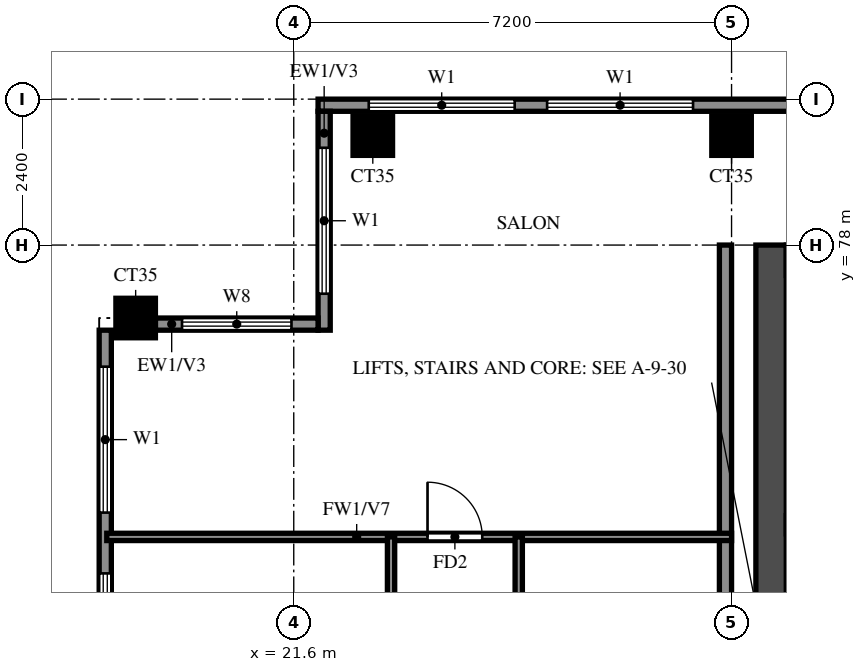
"""IFC4 building model, lengths in metres.
Left out: names, types, materials, properties, quantities, classifications, styles, units other than length and angle.
Written with IfcOpenShell. Run it as: python <this file> out.ifc"""

import sys

from ifc_helpers import new_model, si_unit, direction, frame, frame_2d, origin, origin_2d, place, context, subcontext, project, spatial, rectangle, extrude, source, transform, mapped, element, fill, save


model = new_model("IFC4")
c1 = context("Model", 3, precision=1e-05, world=origin(), true_north=direction((0.0, 1.0)))
c2 = subcontext(c1, "Body", "Model", "MODEL_VIEW")
j1 = project(units=[si_unit("LENGTHUNIT", "METRE"), si_unit("PLANEANGLEUNIT", "RADIAN")], contexts=[c1])
p1 = place(None, origin())
s1 = spatial("IfcSite", under=j1, at=p1, CompositionType="ELEMENT")
p2 = place(p1, origin())
s2 = spatial("IfcBuilding", under=s1, at=p2, CompositionType="ELEMENT")
p3 = place(p2, frame((0.0, 0.0, 236.0)))
s3 = spatial("IfcBuildingStorey", under=s2, at=p3, CompositionType="ELEMENT", Elevation=236.0)
m1 = source(origin(), c2, "Body", "SweptSolid", [
    extrude(rectangle(XDim=0.65, YDim=0.65, at=origin_2d()), origin(), (0.0, 0.0, 1.0), 3.22),
])
for number, where, z_axis, x_axis in (
    (1, (19.0, 76.8, 0.0), (0.0, 0.0, 1.0), (1.0, 0.0, 0.0)),
    (2, (22.9, 79.8, 0.0), (0.0, 0.0, 1.0), (1.0, 0.0, 0.0)),
    (3, (28.8, 79.8, 0.0), (0.0, 0.0, 1.0), (1.0, 0.0, 0.0)),
):
    element("IfcColumn", number, at=place(p3, frame(where, z_axis=z_axis, x_axis=x_axis)), inside=s3, PredefinedType="COLUMN", context=c2, shape_type="MappedRepresentation", body=[
        mapped(m1, transform((0.0, 0.0, 0.0))),
    ])
p4 = place(p3, frame((29.45, 66.15, 0.0), z_axis=(0.0, 0.0, 1.0), x_axis=(0.0, 1.0, 0.0)))
e4 = element("IfcWall", 4, at=p4, inside=s3, PredefinedType="SHEAR", context=c2, shape_type="SweptSolid", body=[
    extrude(rectangle(XDim=11.85, YDim=0.5, at=frame_2d((5.925, 0.0))), origin(), (0.0, 0.0, 1.0), 3.22),
])
p5 = place(p3, frame((78.6, 80.3, 0.0), z_axis=(0.0, 0.0, 1.0), x_axis=(-1.0, 0.0, 0.0)))
e5 = element("IfcWall", 5, at=p5, inside=s3, PredefinedType="SOLIDWALL", context=c2, shape_type="SweptSolid", body=[
    extrude(rectangle(XDim=56.6, YDim=0.2, at=frame_2d((28.3, 0.0))), origin(), (0.0, 0.0, 1.0), 3.22),
])
p6 = place(p5, frame((3.9, 0.0, 0.0)))
e6 = element("IfcOpeningElement", 6, at=p6, cuts=e5, PredefinedType="OPENING", context=c2, shape_type="SweptSolid", body=[
    extrude(rectangle(XDim=1.8, YDim=2.4, at=frame_2d((0.9, 1.2))), frame((0.0, 0.11, 0.0), z_axis=(0.0, -1.0, 0.0), x_axis=(1.0, 0.0, 0.0)), (0.0, 0.0, 1.0), 0.22),
])
p7 = place(p5, frame((50.433, 0.0, 0.6)))
e7 = element("IfcOpeningElement", 7, at=p7, cuts=e5, PredefinedType="OPENING", context=c2, shape_type="SweptSolid", body=[
    extrude(rectangle(XDim=2.4, YDim=2.4, at=frame_2d((1.2, 1.2))), frame((0.0, 0.11, 0.0), z_axis=(0.0, -1.0, 0.0), x_axis=(1.0, 0.0, 0.0)), (0.0, 0.0, 1.0), 0.22),
])
p8 = place(p5, frame((53.367, 0.0, 0.6)))
e8 = element("IfcOpeningElement", 8, at=p8, cuts=e5, PredefinedType="OPENING", context=c2, shape_type="SweptSolid", body=[
    extrude(rectangle(XDim=2.4, YDim=2.4, at=frame_2d((1.2, 1.2))), frame((0.0, 0.11, 0.0), z_axis=(0.0, -1.0, 0.0), x_axis=(1.0, 0.0, 0.0)), (0.0, 0.0, 1.0), 0.22),
])
p9 = place(p5, frame((0.4, 0.0, 0.6)))
e9 = element("IfcOpeningElement", 9, at=p9, cuts=e5, PredefinedType="OPENING", context=c2, shape_type="SweptSolid", body=[
    extrude(rectangle(XDim=1.2, YDim=2.4, at=frame_2d((0.6, 1.2))), frame((0.0, 0.11, 0.0), z_axis=(0.0, -1.0, 0.0), x_axis=(1.0, 0.0, 0.0)), (0.0, 0.0, 1.0), 0.22),
])
p10 = place(p5, frame((2.55, 0.0, 0.6)))
e10 = element("IfcOpeningElement", 10, at=p10, cuts=e5, PredefinedType="OPENING", context=c2, shape_type="SweptSolid", body=[
    extrude(rectangle(XDim=0.9, YDim=2.4, at=frame_2d((0.45, 1.2))), frame((0.0, 0.11, 0.0), z_axis=(0.0, -1.0, 0.0), x_axis=(1.0, 0.0, 0.0)), (0.0, 0.0, 1.0), 0.22),
])
p11 = place(p3, frame((22.1, 80.2, 0.0), z_axis=(0.0, 0.0, 1.0), x_axis=(0.0, -1.0, 0.0)))
e11 = element("IfcWall", 11, at=p11, inside=s3, PredefinedType="SOLIDWALL", context=c2, shape_type="SweptSolid", body=[
    extrude(rectangle(XDim=3.6, YDim=0.2, at=frame_2d((1.8, 0.0))), origin(), (0.0, 0.0, 1.0), 3.22),
])
p12 = place(p11, frame((0.6, 0.0, 0.6)))
e12 = element("IfcOpeningElement", 12, at=p12, cuts=e11, PredefinedType="OPENING", context=c2, shape_type="SweptSolid", body=[
    extrude(rectangle(XDim=2.4, YDim=2.4, at=frame_2d((1.2, 1.2))), frame((0.0, 0.11, 0.0), z_axis=(0.0, -1.0, 0.0), x_axis=(1.0, 0.0, 0.0)), (0.0, 0.0, 1.0), 0.22),
])
p13 = place(p3, frame((22.0, 76.7, 0.0), z_axis=(0.0, 0.0, 1.0), x_axis=(-1.0, 0.0, 0.0)))
e13 = element("IfcWall", 13, at=p13, inside=s3, PredefinedType="SOLIDWALL", context=c2, shape_type="SweptSolid", body=[
    extrude(rectangle(XDim=2.675, YDim=0.2, at=frame_2d((1.337, 0.0))), origin(), (0.0, 0.0, 1.0), 3.22),
])
p14 = place(p13, frame((0.438, 0.0, 0.6)))
e14 = element("IfcOpeningElement", 14, at=p14, cuts=e13, PredefinedType="OPENING", context=c2, shape_type="SweptSolid", body=[
    extrude(rectangle(XDim=1.8, YDim=2.4, at=frame_2d((0.9, 1.2))), frame((0.0, 0.11, 0.0), z_axis=(0.0, -1.0, 0.0), x_axis=(1.0, 0.0, 0.0)), (0.0, 0.0, 1.0), 0.22),
])
p15 = place(p3, frame((18.5, 76.6, 0.0), z_axis=(0.0, 0.0, 1.0), x_axis=(0.0, -1.0, 0.0)))
e15 = element("IfcWall", 15, at=p15, inside=s3, PredefinedType="SOLIDWALL", context=c2, shape_type="SweptSolid", body=[
    extrude(rectangle(XDim=14.2, YDim=0.2, at=frame_2d((7.1, 0.0))), origin(), (0.0, 0.0, 1.0), 3.22),
])
p16 = place(p15, frame((11.1, 0.0, 0.6)))
e16 = element("IfcOpeningElement", 16, at=p16, cuts=e15, PredefinedType="OPENING", context=c2, shape_type="SweptSolid", body=[
    extrude(rectangle(XDim=2.4, YDim=2.4, at=frame_2d((1.2, 1.2))), frame((0.0, 0.11, 0.0), z_axis=(0.0, -1.0, 0.0), x_axis=(1.0, 0.0, 0.0)), (0.0, 0.0, 1.0), 0.22),
])
p17 = place(p15, frame((7.6, 0.0, 0.6)))
e17 = element("IfcOpeningElement", 17, at=p17, cuts=e15, PredefinedType="OPENING", context=c2, shape_type="SweptSolid", body=[
    extrude(rectangle(XDim=2.4, YDim=2.4, at=frame_2d((1.2, 1.2))), frame((0.0, 0.11, 0.0), z_axis=(0.0, -1.0, 0.0), x_axis=(1.0, 0.0, 0.0)), (0.0, 0.0, 1.0), 0.22),
])
p18 = place(p15, frame((4.0, 0.0, 0.6)))
e18 = element("IfcOpeningElement", 18, at=p18, cuts=e15, PredefinedType="OPENING", context=c2, shape_type="SweptSolid", body=[
    extrude(rectangle(XDim=2.4, YDim=2.4, at=frame_2d((1.2, 1.2))), frame((0.0, 0.11, 0.0), z_axis=(0.0, -1.0, 0.0), x_axis=(1.0, 0.0, 0.0)), (0.0, 0.0, 1.0), 0.22),
])
p19 = place(p15, frame((0.6, 0.0, 0.6)))
e19 = element("IfcOpeningElement", 19, at=p19, cuts=e15, PredefinedType="OPENING", context=c2, shape_type="SweptSolid", body=[
    extrude(rectangle(XDim=2.4, YDim=2.4, at=frame_2d((1.2, 1.2))), frame((0.0, 0.11, 0.0), z_axis=(0.0, -1.0, 0.0), x_axis=(1.0, 0.0, 0.0)), (0.0, 0.0, 1.0), 0.22),
])
p20 = place(p3, frame((28.7, 62.4, 0.0), z_axis=(0.0, 0.0, 1.0), x_axis=(0.0, 1.0, 0.0)))
e20 = element("IfcWall", 20, at=p20, inside=s3, PredefinedType="SOLIDWALL", context=c2, shape_type="SweptSolid", body=[
    extrude(rectangle(XDim=15.6, YDim=0.2, at=frame_2d((7.8, 0.0))), origin(), (0.0, 0.0, 1.0), 3.22),
])
p21 = place(p3, frame((18.525, 73.2, 0.0), z_axis=(0.0, 0.0, 1.0), x_axis=(1.0, 0.0, 0.0)))
e21 = element("IfcWall", 21, at=p21, inside=s3, PredefinedType="PARTITIONING", context=c2, shape_type="SweptSolid", body=[
    extrude(rectangle(XDim=10.275, YDim=0.12, at=frame_2d((5.138, 0.0))), origin(), (0.0, 0.0, 1.0), 2.32),
])
p22 = place(p21, frame((5.275, 0.0, 0.0)))
e22 = element("IfcOpeningElement", 22, at=p22, cuts=e21, PredefinedType="OPENING", context=c2, shape_type="SweptSolid", body=[
    extrude(rectangle(XDim=0.9, YDim=2.1, at=frame_2d((0.45, 1.05))), frame((0.0, 0.07, 0.0), z_axis=(0.0, -1.0, 0.0), x_axis=(1.0, 0.0, 0.0)), (0.0, 0.0, 1.0), 0.14),
])
p23 = place(p3, frame((23.2, 48.0, 0.0), z_axis=(0.0, 0.0, 1.0), x_axis=(0.0, 1.0, 0.0)))
e23 = element("IfcWall", 23, at=p23, inside=s3, PredefinedType="PARTITIONING", context=c2, shape_type="SweptSolid", body=[
    extrude(rectangle(XDim=25.2, YDim=0.12, at=frame_2d((12.6, 0.0))), origin(), (0.0, 0.0, 1.0), 3.22),
])
p24 = place(p23, frame((2.85, 0.0, 0.0)))
e24 = element("IfcOpeningElement", 24, at=p24, cuts=e23, PredefinedType="OPENING", context=c2, shape_type="SweptSolid", body=[
    extrude(rectangle(XDim=1.5, YDim=2.1, at=frame_2d((0.75, 1.05))), frame((0.0, 0.07, 0.0), z_axis=(0.0, -1.0, 0.0), x_axis=(1.0, 0.0, 0.0)), (0.0, 0.0, 1.0), 0.14),
])
p25 = place(p23, frame((8.55, 0.0, 0.0)))
e25 = element("IfcOpeningElement", 25, at=p25, cuts=e23, PredefinedType="OPENING", context=c2, shape_type="SweptSolid", body=[
    extrude(rectangle(XDim=0.9, YDim=2.1, at=frame_2d((0.45, 1.05))), frame((0.0, 0.07, 0.0), z_axis=(0.0, -1.0, 0.0), x_axis=(1.0, 0.0, 0.0)), (0.0, 0.0, 1.0), 0.14),
])
p26 = place(p23, frame((12.15, 0.0, 0.0)))
e26 = element("IfcOpeningElement", 26, at=p26, cuts=e23, PredefinedType="OPENING", context=c2, shape_type="SweptSolid", body=[
    extrude(rectangle(XDim=0.9, YDim=2.1, at=frame_2d((0.45, 1.05))), frame((0.0, 0.07, 0.0), z_axis=(0.0, -1.0, 0.0), x_axis=(1.0, 0.0, 0.0)), (0.0, 0.0, 1.0), 0.14),
])
p27 = place(p23, frame((15.75, 0.0, 0.0)))
e27 = element("IfcOpeningElement", 27, at=p27, cuts=e23, PredefinedType="OPENING", context=c2, shape_type="SweptSolid", body=[
    extrude(rectangle(XDim=0.9, YDim=2.1, at=frame_2d((0.45, 1.05))), frame((0.0, 0.07, 0.0), z_axis=(0.0, -1.0, 0.0), x_axis=(1.0, 0.0, 0.0)), (0.0, 0.0, 1.0), 0.14),
])
p28 = place(p23, frame((19.35, 0.0, 0.0)))
e28 = element("IfcOpeningElement", 28, at=p28, cuts=e23, PredefinedType="OPENING", context=c2, shape_type="SweptSolid", body=[
    extrude(rectangle(XDim=0.9, YDim=2.1, at=frame_2d((0.45, 1.05))), frame((0.0, 0.07, 0.0), z_axis=(0.0, -1.0, 0.0), x_axis=(1.0, 0.0, 0.0)), (0.0, 0.0, 1.0), 0.14),
])
p29 = place(p23, frame((22.95, 0.0, 0.0)))
e29 = element("IfcOpeningElement", 29, at=p29, cuts=e23, PredefinedType="OPENING", context=c2, shape_type="SweptSolid", body=[
    extrude(rectangle(XDim=0.9, YDim=2.1, at=frame_2d((0.45, 1.05))), frame((0.0, 0.07, 0.0), z_axis=(0.0, -1.0, 0.0), x_axis=(1.0, 0.0, 0.0)), (0.0, 0.0, 1.0), 0.14),
])
p30 = place(p3, frame((25.3, 61.2, 0.0), z_axis=(0.0, 0.0, 1.0), x_axis=(0.0, 1.0, 0.0)))
e30 = element("IfcWall", 30, at=p30, inside=s3, PredefinedType="PARTITIONING", context=c2, shape_type="SweptSolid", body=[
    extrude(rectangle(XDim=12.0, YDim=0.12, at=frame_2d((6.0, 0.0))), origin(), (0.0, 0.0, 1.0), 3.22),
])
p31 = place(p30, frame((4.45, 0.0, 0.0)))
e31 = element("IfcOpeningElement", 31, at=p31, cuts=e30, PredefinedType="OPENING", context=c2, shape_type="SweptSolid", body=[
    extrude(rectangle(XDim=0.9, YDim=2.1, at=frame_2d((0.45, 1.05))), frame((0.0, 0.07, 0.0), z_axis=(0.0, -1.0, 0.0), x_axis=(1.0, 0.0, 0.0)), (0.0, 0.0, 1.0), 0.14),
])
p32 = place(p30, frame((9.225, 0.0, 0.0)))
e32 = element("IfcOpeningElement", 32, at=p32, cuts=e30, PredefinedType="OPENING", context=c2, shape_type="SweptSolid", body=[
    extrude(rectangle(XDim=0.9, YDim=2.1, at=frame_2d((0.45, 1.05))), frame((0.0, 0.07, 0.0), z_axis=(0.0, -1.0, 0.0), x_axis=(1.0, 0.0, 0.0)), (0.0, 0.0, 1.0), 0.14),
])
p33 = place(p7, origin())
e33 = element("IfcWindow", 33, at=p33, inside=s3, PartitioningType="DOUBLE_PANEL_VERTICAL", PredefinedType="WINDOW", context=c2, shape_type="SweptSolid", body=[
    extrude(rectangle(XDim=2.4, YDim=2.4, at=frame_2d((1.2, 1.2))), frame((0.0, 0.03, 0.0), z_axis=(0.0, -1.0, 0.0), x_axis=(1.0, 0.0, 0.0)), (0.0, 0.0, 1.0), 0.06),
])
fill(e7, e33)
p34 = place(p8, origin())
e34 = element("IfcWindow", 34, at=p34, inside=s3, PartitioningType="DOUBLE_PANEL_VERTICAL", PredefinedType="WINDOW", context=c2, shape_type="SweptSolid", body=[
    extrude(rectangle(XDim=2.4, YDim=2.4, at=frame_2d((1.2, 1.2))), frame((0.0, 0.03, 0.0), z_axis=(0.0, -1.0, 0.0), x_axis=(1.0, 0.0, 0.0)), (0.0, 0.0, 1.0), 0.06),
])
fill(e8, e34)
p35 = place(p12, origin())
e35 = element("IfcWindow", 35, at=p35, inside=s3, PartitioningType="DOUBLE_PANEL_VERTICAL", PredefinedType="WINDOW", context=c2, shape_type="SweptSolid", body=[
    extrude(rectangle(XDim=2.4, YDim=2.4, at=frame_2d((1.2, 1.2))), frame((0.0, 0.03, 0.0), z_axis=(0.0, -1.0, 0.0), x_axis=(1.0, 0.0, 0.0)), (0.0, 0.0, 1.0), 0.06),
])
fill(e12, e35)
p36 = place(p14, origin())
e36 = element("IfcWindow", 36, at=p36, inside=s3, PartitioningType="DOUBLE_PANEL_VERTICAL", PredefinedType="WINDOW", context=c2, shape_type="SweptSolid", body=[
    extrude(rectangle(XDim=1.8, YDim=2.4, at=frame_2d((0.9, 1.2))), frame((0.0, 0.03, 0.0), z_axis=(0.0, -1.0, 0.0), x_axis=(1.0, 0.0, 0.0)), (0.0, 0.0, 1.0), 0.06),
])
fill(e14, e36)
p37 = place(p18, origin())
e37 = element("IfcWindow", 37, at=p37, inside=s3, PartitioningType="DOUBLE_PANEL_VERTICAL", PredefinedType="WINDOW", context=c2, shape_type="SweptSolid", body=[
    extrude(rectangle(XDim=2.4, YDim=2.4, at=frame_2d((1.2, 1.2))), frame((0.0, 0.03, 0.0), z_axis=(0.0, -1.0, 0.0), x_axis=(1.0, 0.0, 0.0)), (0.0, 0.0, 1.0), 0.06),
])
fill(e18, e37)
p38 = place(p19, origin())
e38 = element("IfcWindow", 38, at=p38, inside=s3, PartitioningType="DOUBLE_PANEL_VERTICAL", PredefinedType="WINDOW", context=c2, shape_type="SweptSolid", body=[
    extrude(rectangle(XDim=2.4, YDim=2.4, at=frame_2d((1.2, 1.2))), frame((0.0, 0.03, 0.0), z_axis=(0.0, -1.0, 0.0), x_axis=(1.0, 0.0, 0.0)), (0.0, 0.0, 1.0), 0.06),
])
fill(e19, e38)
p39 = place(p22, origin())
e39 = element("IfcDoor", 39, at=p39, inside=s3, OperationType="SINGLE_SWING_LEFT", PredefinedType="DOOR", context=c2, shape_type="SweptSolid", body=[
    extrude(rectangle(XDim=0.9, YDim=2.1, at=frame_2d((0.45, 1.05))), frame((0.0, 0.025, 0.0), z_axis=(0.0, -1.0, 0.0), x_axis=(1.0, 0.0, 0.0)), (0.0, 0.0, 1.0), 0.05),
])
fill(e22, e39)
save(model, sys.argv[1])
